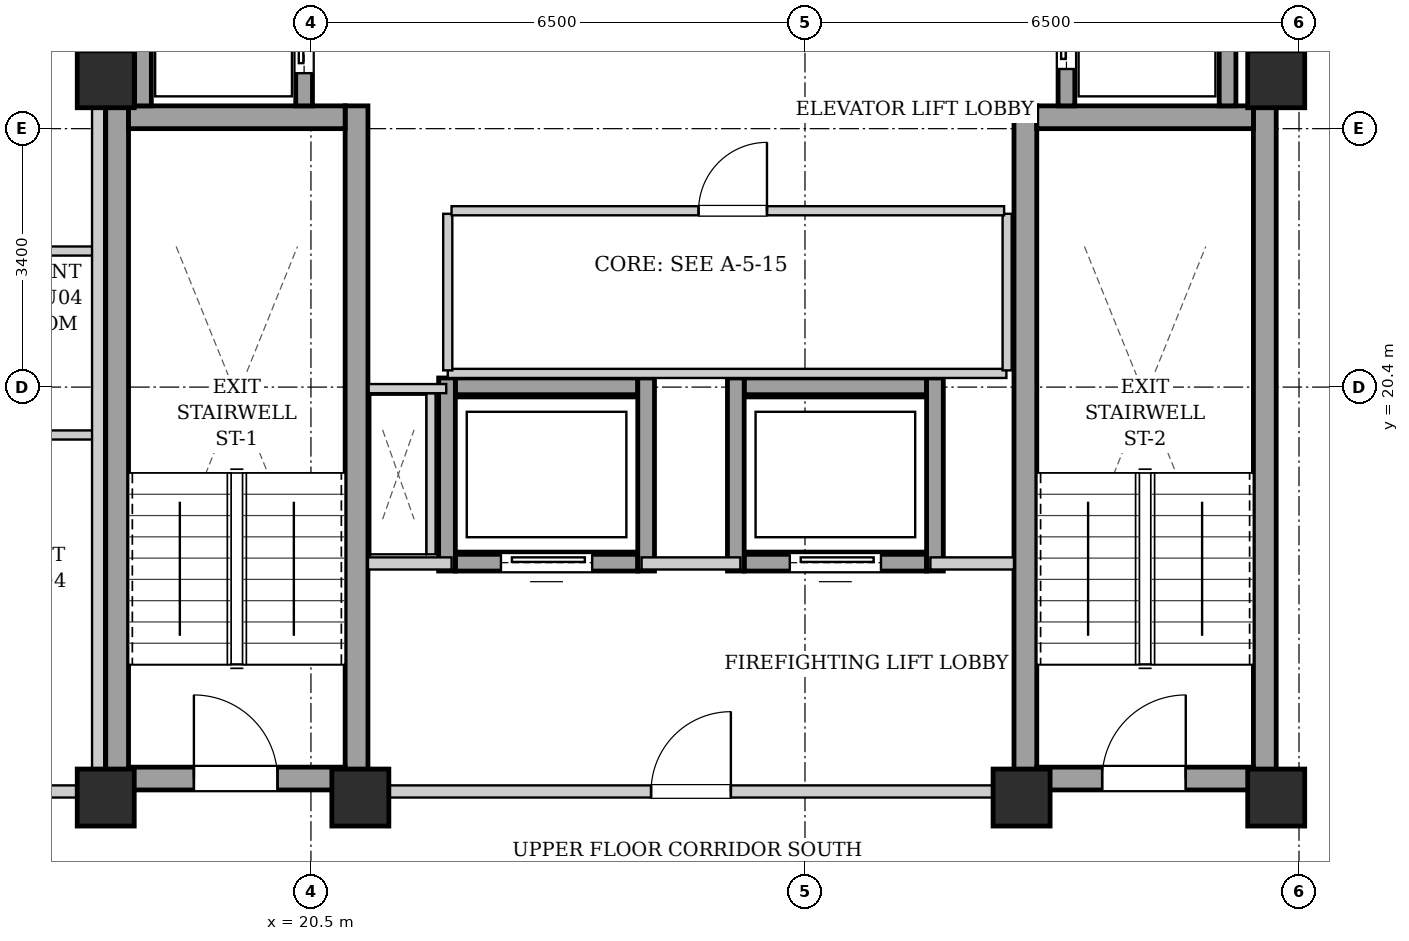
"""IFC4 building model, lengths in metres.
Left out: names, types, materials, properties, quantities, classifications, styles, units other than length and angle.
Written with IfcOpenShell. Run it as: python <this file> out.ifc"""

import sys

from ifc_helpers import new_model, si_unit, direction, frame, frame_2d, origin, origin_2d, place, context, subcontext, project, spatial, rectangle, extrude, element, fill, save


model = new_model("IFC4")
c1 = context("Model", 3, precision=1e-05, world=origin(), true_north=direction((0.0, 1.0)))
c2 = subcontext(c1, "Body", "Model", "MODEL_VIEW")
j1 = project(units=[si_unit("LENGTHUNIT", "METRE"), si_unit("PLANEANGLEUNIT", "RADIAN")], contexts=[c1])
p1 = place(None, origin())
s1 = spatial("IfcSite", under=j1, at=p1, CompositionType="ELEMENT")
p2 = place(p1, origin())
s2 = spatial("IfcBuilding", under=s1, at=p2, CompositionType="ELEMENT")
p3 = place(p2, frame((0.0, 0.0, 224.1)))
s3 = spatial("IfcBuildingStorey", under=s2, at=p3, CompositionType="ELEMENT", Elevation=224.1)
for number, where, z_axis, x_axis in (
    (1, (17.8, 15.0, 0.0), (0.0, 0.0, 1.0), (1.0, 0.0, 0.0)),
    (2, (21.15, 15.0, 0.0), (0.0, 0.0, 1.0), (1.0, 0.0, 0.0)),
    (3, (29.85, 15.0, 0.0), (0.0, 0.0, 1.0), (1.0, 0.0, 0.0)),
    (4, (33.2, 15.0, 0.0), (0.0, 0.0, 1.0), (1.0, 0.0, 0.0)),
    (5, (17.8, 24.45, 0.0), (0.0, 0.0, 1.0), (1.0, 0.0, 0.0)),
    (6, (33.2, 24.45, 0.0), (0.0, 0.0, 1.0), (1.0, 0.0, 0.0)),
):
    element("IfcColumn", number, at=place(p3, frame(where, z_axis=z_axis, x_axis=x_axis)), inside=s3, PredefinedType="COLUMN", context=c2, shape_type="SweptSolid", body=[
        extrude(rectangle(XDim=0.75, YDim=0.75, at=origin_2d()), origin(), (0.0, 0.0, 1.0), 3.4),
    ])
for number, where, z_axis, x_axis in (
    (7, (17.95, 15.1, 0.0), (0.0, 0.0, 1.0), (0.0, 1.0, 0.0)),
    (8, (21.1, 15.1, 0.0), (0.0, 0.0, 1.0), (0.0, 1.0, 0.0)),
):
    element("IfcWall", number, at=place(p3, frame(where, z_axis=z_axis, x_axis=x_axis)), inside=s3, PredefinedType="SHEAR", context=c2, shape_type="SweptSolid", body=[
        extrude(rectangle(XDim=9.0, YDim=0.3, at=frame_2d((4.5, 0.0))), origin(), (0.0, 0.0, 1.0), 3.14),
    ])
p4 = place(p3, frame((18.1, 23.95, 0.0), z_axis=(0.0, 0.0, 1.0), x_axis=(1.0, 0.0, 0.0)))
e9 = element("IfcWall", 9, at=p4, inside=s3, PredefinedType="SHEAR", context=c2, shape_type="SweptSolid", body=[
    extrude(rectangle(XDim=2.85, YDim=0.3, at=frame_2d((1.425, 0.0))), origin(), (0.0, 0.0, 1.0), 3.14),
])
p5 = place(p3, frame((18.1, 15.25, 0.0), z_axis=(0.0, 0.0, 1.0), x_axis=(1.0, 0.0, 0.0)))
e10 = element("IfcWall", 10, at=p5, inside=s3, PredefinedType="SHEAR", context=c2, shape_type="SweptSolid", body=[
    extrude(rectangle(XDim=2.85, YDim=0.3, at=frame_2d((1.425, 0.0))), origin(), (0.0, 0.0, 1.0), 3.14),
])
p6 = place(p5, frame((0.86, 0.0, 0.0)))
e11 = element("IfcOpeningElement", 11, at=p6, cuts=e10, PredefinedType="OPENING", context=c2, shape_type="SweptSolid", body=[
    extrude(rectangle(XDim=1.1, YDim=2.05, at=frame_2d((0.55, 1.025))), frame((0.0, 0.16, 0.0), z_axis=(0.0, -1.0, 0.0), x_axis=(1.0, 0.0, 0.0)), (0.0, 0.0, 1.0), 0.32),
])
for number, where, z_axis, x_axis in (
    (12, (29.9, 15.1, 0.0), (0.0, 0.0, 1.0), (0.0, 1.0, 0.0)),
    (13, (33.05, 15.1, 0.0), (0.0, 0.0, 1.0), (0.0, 1.0, 0.0)),
):
    element("IfcWall", number, at=place(p3, frame(where, z_axis=z_axis, x_axis=x_axis)), inside=s3, PredefinedType="SHEAR", context=c2, shape_type="SweptSolid", body=[
        extrude(rectangle(XDim=9.0, YDim=0.3, at=frame_2d((4.5, 0.0))), origin(), (0.0, 0.0, 1.0), 3.14),
    ])
p7 = place(p3, frame((30.05, 23.95, 0.0), z_axis=(0.0, 0.0, 1.0), x_axis=(1.0, 0.0, 0.0)))
e14 = element("IfcWall", 14, at=p7, inside=s3, PredefinedType="SHEAR", context=c2, shape_type="SweptSolid", body=[
    extrude(rectangle(XDim=2.85, YDim=0.3, at=frame_2d((1.425, 0.0))), origin(), (0.0, 0.0, 1.0), 3.14),
])
p8 = place(p3, frame((30.05, 15.25, 0.0), z_axis=(0.0, 0.0, 1.0), x_axis=(1.0, 0.0, 0.0)))
e15 = element("IfcWall", 15, at=p8, inside=s3, PredefinedType="SHEAR", context=c2, shape_type="SweptSolid", body=[
    extrude(rectangle(XDim=2.85, YDim=0.3, at=frame_2d((1.425, 0.0))), origin(), (0.0, 0.0, 1.0), 3.14),
])
p9 = place(p8, frame((0.86, 0.0, 0.0)))
e16 = element("IfcOpeningElement", 16, at=p9, cuts=e15, PredefinedType="OPENING", context=c2, shape_type="SweptSolid", body=[
    extrude(rectangle(XDim=1.1, YDim=2.05, at=frame_2d((0.55, 1.025))), frame((0.0, 0.16, 0.0), z_axis=(0.0, -1.0, 0.0), x_axis=(1.0, 0.0, 0.0)), (0.0, 0.0, 1.0), 0.32),
])
p10 = place(p3, frame((18.29, 24.1, 0.0), z_axis=(0.0, 0.0, 1.0), x_axis=(0.0, 1.0, 0.0)))
e17 = element("IfcWall", 17, at=p10, inside=s3, PredefinedType="SHEAR", context=c2, shape_type="SweptSolid", body=[
    extrude(rectangle(XDim=4.14, YDim=0.22, at=frame_2d((2.07, 0.0))), origin(), (0.0, 0.0, 1.0), 3.14),
])
p11 = place(p3, frame((20.41, 24.1, 0.0), z_axis=(0.0, 0.0, 1.0), x_axis=(0.0, 1.0, 0.0)))
e18 = element("IfcWall", 18, at=p11, inside=s3, PredefinedType="SHEAR", context=c2, shape_type="SweptSolid", body=[
    extrude(rectangle(XDim=1.96, YDim=0.22, at=frame_2d((0.98, 0.0))), origin(), (0.0, 0.0, 1.0), 3.14),
])
p12 = place(p11, frame((0.43, 0.0, 0.0)))
e19 = element("IfcOpeningElement", 19, at=p12, cuts=e18, PredefinedType="OPENING", context=c2, shape_type="SweptSolid", body=[
    extrude(rectangle(XDim=1.1, YDim=2.15, at=frame_2d((0.55, 1.075))), frame((0.0, 0.12, 0.0), z_axis=(0.0, -1.0, 0.0), x_axis=(1.0, 0.0, 0.0)), (0.0, 0.0, 1.0), 0.24),
])
p13 = place(p3, frame((30.44, 24.1, 0.0), z_axis=(0.0, 0.0, 1.0), x_axis=(0.0, 1.0, 0.0)))
e20 = element("IfcWall", 20, at=p13, inside=s3, PredefinedType="SHEAR", context=c2, shape_type="SweptSolid", body=[
    extrude(rectangle(XDim=2.07, YDim=0.22, at=frame_2d((1.035, 0.0))), origin(), (0.0, 0.0, 1.0), 3.14),
])
p14 = place(p13, frame((0.485, 0.0, 0.0)))
e21 = element("IfcOpeningElement", 21, at=p14, cuts=e20, PredefinedType="OPENING", context=c2, shape_type="SweptSolid", body=[
    extrude(rectangle(XDim=1.1, YDim=2.15, at=frame_2d((0.55, 1.075))), frame((0.0, 0.12, 0.0), z_axis=(0.0, -1.0, 0.0), x_axis=(1.0, 0.0, 0.0)), (0.0, 0.0, 1.0), 0.24),
])
p15 = place(p3, frame((32.56, 24.1, 0.0), z_axis=(0.0, 0.0, 1.0), x_axis=(0.0, 1.0, 0.0)))
e22 = element("IfcWall", 22, at=p15, inside=s3, PredefinedType="SHEAR", context=c2, shape_type="SweptSolid", body=[
    extrude(rectangle(XDim=2.07, YDim=0.22, at=frame_2d((1.035, 0.0))), origin(), (0.0, 0.0, 1.0), 3.14),
])
p16 = place(p3, frame((22.4, 18.09, 0.0), z_axis=(0.0, 0.0, 1.0), x_axis=(1.0, 0.0, 0.0)))
e23 = element("IfcWall", 23, at=p16, inside=s3, PredefinedType="SHEAR", context=c2, shape_type="SweptSolid", body=[
    extrude(rectangle(XDim=2.4, YDim=0.22, at=frame_2d((1.2, 0.0))), origin(), (0.0, 0.0, 1.0), 3.14),
])
p17 = place(p16, frame((0.6, 0.0, 0.0)))
e24 = element("IfcOpeningElement", 24, at=p17, cuts=e23, PredefinedType="OPENING", context=c2, shape_type="SweptSolid", body=[
    extrude(rectangle(XDim=1.2, YDim=2.15, at=frame_2d((0.6, 1.075))), frame((0.0, 0.12, 0.0), z_axis=(0.0, -1.0, 0.0), x_axis=(1.0, 0.0, 0.0)), (0.0, 0.0, 1.0), 0.24),
])
p18 = place(p3, frame((22.4, 20.41, 0.0), z_axis=(0.0, 0.0, 1.0), x_axis=(1.0, 0.0, 0.0)))
e25 = element("IfcWall", 25, at=p18, inside=s3, PredefinedType="SHEAR", context=c2, shape_type="SweptSolid", body=[
    extrude(rectangle(XDim=2.4, YDim=0.22, at=frame_2d((1.2, 0.0))), origin(), (0.0, 0.0, 1.0), 3.14),
])
for number, where, z_axis, x_axis in (
    (26, (22.29, 17.98, 0.0), (0.0, 0.0, 1.0), (0.0, 1.0, 0.0)),
    (27, (24.91, 17.98, 0.0), (0.0, 0.0, 1.0), (0.0, 1.0, 0.0)),
):
    element("IfcWall", number, at=place(p3, frame(where, z_axis=z_axis, x_axis=x_axis)), inside=s3, PredefinedType="SHEAR", context=c2, shape_type="SweptSolid", body=[
        extrude(rectangle(XDim=2.54, YDim=0.22, at=frame_2d((1.27, 0.0))), origin(), (0.0, 0.0, 1.0), 3.14),
    ])
p19 = place(p3, frame((26.2, 18.09, 0.0), z_axis=(0.0, 0.0, 1.0), x_axis=(1.0, 0.0, 0.0)))
e28 = element("IfcWall", 28, at=p19, inside=s3, PredefinedType="SHEAR", context=c2, shape_type="SweptSolid", body=[
    extrude(rectangle(XDim=2.4, YDim=0.22, at=frame_2d((1.2, 0.0))), origin(), (0.0, 0.0, 1.0), 3.14),
])
p20 = place(p19, frame((0.6, 0.0, 0.0)))
e29 = element("IfcOpeningElement", 29, at=p20, cuts=e28, PredefinedType="OPENING", context=c2, shape_type="SweptSolid", body=[
    extrude(rectangle(XDim=1.2, YDim=2.15, at=frame_2d((0.6, 1.075))), frame((0.0, 0.12, 0.0), z_axis=(0.0, -1.0, 0.0), x_axis=(1.0, 0.0, 0.0)), (0.0, 0.0, 1.0), 0.24),
])
p21 = place(p3, frame((26.2, 20.41, 0.0), z_axis=(0.0, 0.0, 1.0), x_axis=(1.0, 0.0, 0.0)))
e30 = element("IfcWall", 30, at=p21, inside=s3, PredefinedType="SHEAR", context=c2, shape_type="SweptSolid", body=[
    extrude(rectangle(XDim=2.4, YDim=0.22, at=frame_2d((1.2, 0.0))), origin(), (0.0, 0.0, 1.0), 3.14),
])
for number, where, z_axis, x_axis in (
    (31, (26.09, 17.98, 0.0), (0.0, 0.0, 1.0), (0.0, 1.0, 0.0)),
    (32, (28.71, 17.98, 0.0), (0.0, 0.0, 1.0), (0.0, 1.0, 0.0)),
):
    element("IfcWall", number, at=place(p3, frame(where, z_axis=z_axis, x_axis=x_axis)), inside=s3, PredefinedType="SHEAR", context=c2, shape_type="SweptSolid", body=[
        extrude(rectangle(XDim=2.54, YDim=0.22, at=frame_2d((1.27, 0.0))), origin(), (0.0, 0.0, 1.0), 3.14),
    ])
p22 = place(p3, frame((21.25, 15.08, 0.0), z_axis=(0.0, 0.0, 1.0), x_axis=(1.0, 0.0, 0.0)))
e33 = element("IfcWall", 33, at=p22, inside=s3, PredefinedType="PARTITIONING", context=c2, shape_type="SweptSolid", body=[
    extrude(rectangle(XDim=8.5, YDim=0.16, at=frame_2d((4.25, 0.0))), origin(), (0.0, 0.0, 1.0), 2.668),
])
p23 = place(p22, frame((3.725, 0.0, 0.0)))
e34 = element("IfcOpeningElement", 34, at=p23, cuts=e33, PredefinedType="OPENING", context=c2, shape_type="SweptSolid", body=[
    extrude(rectangle(XDim=1.05, YDim=2.05, at=frame_2d((0.525, 1.025))), frame((0.0, 0.09, 0.0), z_axis=(0.0, -1.0, 0.0), x_axis=(1.0, 0.0, 0.0)), (0.0, 0.0, 1.0), 0.18),
])
p24 = place(p3, frame((21.25, 18.08, 0.0), z_axis=(0.0, 0.0, 1.0), x_axis=(1.0, 0.0, 0.0)))
e35 = element("IfcWall", 35, at=p24, inside=s3, PredefinedType="PARTITIONING", context=c2, shape_type="SweptSolid", body=[
    extrude(rectangle(XDim=1.1, YDim=0.16, at=frame_2d((0.55, 0.0))), origin(), (0.0, 0.0, 1.0), 3.14),
])
p25 = place(p3, frame((24.85, 18.08, 0.0), z_axis=(0.0, 0.0, 1.0), x_axis=(1.0, 0.0, 0.0)))
e36 = element("IfcWall", 36, at=p25, inside=s3, PredefinedType="PARTITIONING", context=c2, shape_type="SweptSolid", body=[
    extrude(rectangle(XDim=1.3, YDim=0.16, at=frame_2d((0.65, 0.0))), origin(), (0.0, 0.0, 1.0), 3.14),
])
p26 = place(p3, frame((28.65, 18.08, 0.0), z_axis=(0.0, 0.0, 1.0), x_axis=(1.0, 0.0, 0.0)))
e37 = element("IfcWall", 37, at=p26, inside=s3, PredefinedType="PARTITIONING", context=c2, shape_type="SweptSolid", body=[
    extrude(rectangle(XDim=1.1, YDim=0.16, at=frame_2d((0.55, 0.0))), origin(), (0.0, 0.0, 1.0), 3.14),
])
for number, where, z_axis, x_axis in (
    (38, (17.88, 24.12, 0.0), (0.0, 0.0, 1.0), (0.0, 1.0, 0.0)),
    (39, (33.12, 24.12, 0.0), (0.0, 0.0, 1.0), (0.0, 1.0, 0.0)),
):
    element("IfcWall", number, at=place(p3, frame(where, z_axis=z_axis, x_axis=x_axis)), inside=s3, PredefinedType="PARTITIONING", context=c2, shape_type="SweptSolid", body=[
        extrude(rectangle(XDim=4.76, YDim=0.16, at=frame_2d((2.38, 0.0))), origin(), (0.0, 0.0, 1.0), 3.14),
    ])
p27 = place(p3, frame((22.08, 18.2, 0.0), z_axis=(0.0, 0.0, 1.0), x_axis=(0.0, 1.0, 0.0)))
e40 = element("IfcWall", 40, at=p27, inside=s3, PredefinedType="PARTITIONING", context=c2, shape_type="SweptSolid", body=[
    extrude(rectangle(XDim=2.12, YDim=0.12, at=frame_2d((1.06, 0.0))), origin(), (0.0, 0.0, 1.0), 3.14),
])
p28 = place(p3, frame((22.28, 20.38, 0.0), z_axis=(0.0, 0.0, 1.0), x_axis=(-1.0, 0.0, 0.0)))
e41 = element("IfcWall", 41, at=p28, inside=s3, PredefinedType="PARTITIONING", context=c2, shape_type="SweptSolid", body=[
    extrude(rectangle(XDim=1.02, YDim=0.12, at=frame_2d((0.51, 0.0))), origin(), (0.0, 0.0, 1.0), 3.14),
])
p29 = place(p3, frame((22.3, 20.58, 0.0), z_axis=(0.0, 0.0, 1.0), x_axis=(1.0, 0.0, 0.0)))
e42 = element("IfcWall", 42, at=p29, inside=s3, PredefinedType="PARTITIONING", context=c2, shape_type="SweptSolid", body=[
    extrude(rectangle(XDim=7.35, YDim=0.12, at=frame_2d((3.675, 0.0))), origin(), (0.0, 0.0, 1.0), 3.14),
])
for number, where, z_axis, x_axis in (
    (43, (22.3, 20.62, 0.0), (0.0, 0.0, 1.0), (0.0, 1.0, 0.0)),
    (44, (29.66, 20.62, 0.0), (0.0, 0.0, 1.0), (0.0, 1.0, 0.0)),
):
    element("IfcWall", number, at=place(p3, frame(where, z_axis=z_axis, x_axis=x_axis)), inside=s3, PredefinedType="PARTITIONING", context=c2, shape_type="SweptSolid", body=[
        extrude(rectangle(XDim=2.06, YDim=0.12, at=frame_2d((1.03, 0.0))), origin(), (0.0, 0.0, 1.0), 3.14),
    ])
p30 = place(p3, frame((22.35, 22.72, 0.0), z_axis=(0.0, 0.0, 1.0), x_axis=(1.0, 0.0, 0.0)))
e45 = element("IfcWall", 45, at=p30, inside=s3, PredefinedType="PARTITIONING", context=c2, shape_type="SweptSolid", body=[
    extrude(rectangle(XDim=7.27, YDim=0.12, at=frame_2d((3.635, 0.0))), origin(), (0.0, 0.0, 1.0), 3.14),
])
p31 = place(p30, frame((3.25, 0.0, 0.0)))
e46 = element("IfcOpeningElement", 46, at=p31, cuts=e45, PredefinedType="OPENING", context=c2, shape_type="SweptSolid", body=[
    extrude(rectangle(XDim=0.9, YDim=2.05, at=frame_2d((0.45, 1.025))), frame((0.0, 0.07, 0.0), z_axis=(0.0, -1.0, 0.0), x_axis=(1.0, 0.0, 0.0)), (0.0, 0.0, 1.0), 0.14),
])
p32 = place(p3, frame((10.88, 15.08, 0.0), z_axis=(0.0, 0.0, 1.0), x_axis=(1.0, 0.0, 0.0)))
e47 = element("IfcWall", 47, at=p32, inside=s3, PredefinedType="PARTITIONING", context=c2, shape_type="SweptSolid", body=[
    extrude(rectangle(XDim=6.88, YDim=0.16, at=frame_2d((3.44, 0.0))), origin(), (0.0, 0.0, 1.0), 2.668),
])
p33 = place(p32, frame((5.06, 0.0, 0.0)))
e48 = element("IfcOpeningElement", 48, at=p33, cuts=e47, PredefinedType="OPENING", context=c2, shape_type="SweptSolid", body=[
    extrude(rectangle(XDim=0.95, YDim=2.1, at=frame_2d((0.475, 1.05))), frame((0.0, 0.09, 0.0), z_axis=(0.0, -1.0, 0.0), x_axis=(1.0, 0.0, 0.0)), (0.0, 0.0, 1.0), 0.18),
])
p34 = place(p3, frame((15.19, 22.19, 0.0), z_axis=(0.0, 0.0, 1.0), x_axis=(1.0, 0.0, 0.0)))
e49 = element("IfcWall", 49, at=p34, inside=s3, PredefinedType="PARTITIONING", context=c2, shape_type="SweptSolid", body=[
    extrude(rectangle(XDim=2.45, YDim=0.12, at=frame_2d((1.225, 0.0))), origin(), (0.0, 0.0, 1.0), 3.14),
])
p35 = place(p3, frame((15.19, 19.77, 0.0), z_axis=(0.0, 0.0, 1.0), x_axis=(1.0, 0.0, 0.0)))
e50 = element("IfcWall", 50, at=p35, inside=s3, PredefinedType="PARTITIONING", context=c2, shape_type="SweptSolid", body=[
    extrude(rectangle(XDim=2.45, YDim=0.12, at=frame_2d((1.225, 0.0))), origin(), (0.0, 0.0, 1.0), 3.14),
])
p36 = place(p35, frame((0.795, 0.0, 0.0)))
e51 = element("IfcOpeningElement", 51, at=p36, cuts=e50, PredefinedType="OPENING", context=c2, shape_type="SweptSolid", body=[
    extrude(rectangle(XDim=0.86, YDim=2.05, at=frame_2d((0.43, 1.025))), frame((0.0, 0.07, 0.0), z_axis=(0.0, -1.0, 0.0), x_axis=(1.0, 0.0, 0.0)), (0.0, 0.0, 1.0), 0.14),
])
p37 = place(p3, frame((17.7, 15.02, 0.0), z_axis=(0.0, 0.0, 1.0), x_axis=(0.0, 1.0, 0.0)))
e52 = element("IfcWall", 52, at=p37, inside=s3, PredefinedType="PARTITIONING", context=c2, shape_type="SweptSolid", body=[
    extrude(rectangle(XDim=13.98, YDim=0.16, at=frame_2d((6.99, 0.0))), origin(), (0.0, 0.0, 1.0), 3.14),
])
p38 = place(p6, origin())
e53 = element("IfcDoor", 53, at=p38, inside=s3, OperationType="SINGLE_SWING_LEFT", PredefinedType="DOOR", context=c2, shape_type="SweptSolid", body=[
    extrude(rectangle(XDim=1.1, YDim=2.05, at=frame_2d((0.55, 1.025))), frame((0.0, 0.025, 0.0), z_axis=(0.0, -1.0, 0.0), x_axis=(1.0, 0.0, 0.0)), (0.0, 0.0, 1.0), 0.05),
])
fill(e11, e53)
p39 = place(p9, origin())
e54 = element("IfcDoor", 54, at=p39, inside=s3, OperationType="SINGLE_SWING_RIGHT", PredefinedType="DOOR", context=c2, shape_type="SweptSolid", body=[
    extrude(rectangle(XDim=1.1, YDim=2.05, at=frame_2d((0.55, 1.025))), frame((0.0, 0.025, 0.0), z_axis=(0.0, -1.0, 0.0), x_axis=(1.0, 0.0, 0.0)), (0.0, 0.0, 1.0), 0.05),
])
fill(e16, e54)
p40 = place(p12, origin())
e55 = element("IfcDoor", 55, at=p40, inside=s3, OperationType="SLIDING_TO_LEFT", PredefinedType="DOOR", context=c2, shape_type="SweptSolid", body=[
    extrude(rectangle(XDim=1.1, YDim=2.15, at=frame_2d((0.55, 1.075))), frame((0.0, 0.025, 0.0), z_axis=(0.0, -1.0, 0.0), x_axis=(1.0, 0.0, 0.0)), (0.0, 0.0, 1.0), 0.05),
])
fill(e19, e55)
p41 = place(p14, origin())
e56 = element("IfcDoor", 56, at=p41, inside=s3, OperationType="SLIDING_TO_LEFT", PredefinedType="DOOR", context=c2, shape_type="SweptSolid", body=[
    extrude(rectangle(XDim=1.1, YDim=2.15, at=frame_2d((0.55, 1.075))), frame((0.0, 0.025, 0.0), z_axis=(0.0, -1.0, 0.0), x_axis=(1.0, 0.0, 0.0)), (0.0, 0.0, 1.0), 0.05),
])
fill(e21, e56)
p42 = place(p17, origin())
e57 = element("IfcDoor", 57, at=p42, inside=s3, OperationType="SLIDING_TO_LEFT", PredefinedType="DOOR", context=c2, shape_type="SweptSolid", body=[
    extrude(rectangle(XDim=1.2, YDim=2.15, at=frame_2d((0.6, 1.075))), frame((0.0, 0.025, 0.0), z_axis=(0.0, -1.0, 0.0), x_axis=(1.0, 0.0, 0.0)), (0.0, 0.0, 1.0), 0.05),
])
fill(e24, e57)
p43 = place(p20, origin())
e58 = element("IfcDoor", 58, at=p43, inside=s3, OperationType="SLIDING_TO_LEFT", PredefinedType="DOOR", context=c2, shape_type="SweptSolid", body=[
    extrude(rectangle(XDim=1.2, YDim=2.15, at=frame_2d((0.6, 1.075))), frame((0.0, 0.025, 0.0), z_axis=(0.0, -1.0, 0.0), x_axis=(1.0, 0.0, 0.0)), (0.0, 0.0, 1.0), 0.05),
])
fill(e29, e58)
p44 = place(p23, origin())
e59 = element("IfcDoor", 59, at=p44, inside=s3, OperationType="SINGLE_SWING_RIGHT", PredefinedType="DOOR", context=c2, shape_type="SweptSolid", body=[
    extrude(rectangle(XDim=1.05, YDim=2.05, at=frame_2d((0.525, 1.025))), frame((0.0, 0.025, 0.0), z_axis=(0.0, -1.0, 0.0), x_axis=(1.0, 0.0, 0.0)), (0.0, 0.0, 1.0), 0.05),
])
fill(e34, e59)
p45 = place(p31, origin())
e60 = element("IfcDoor", 60, at=p45, inside=s3, OperationType="SINGLE_SWING_RIGHT", PredefinedType="DOOR", context=c2, shape_type="SweptSolid", body=[
    extrude(rectangle(XDim=0.9, YDim=2.05, at=frame_2d((0.45, 1.025))), frame((0.0, 0.025, 0.0), z_axis=(0.0, -1.0, 0.0), x_axis=(1.0, 0.0, 0.0)), (0.0, 0.0, 1.0), 0.05),
])
fill(e46, e60)
save(model, sys.argv[1])
